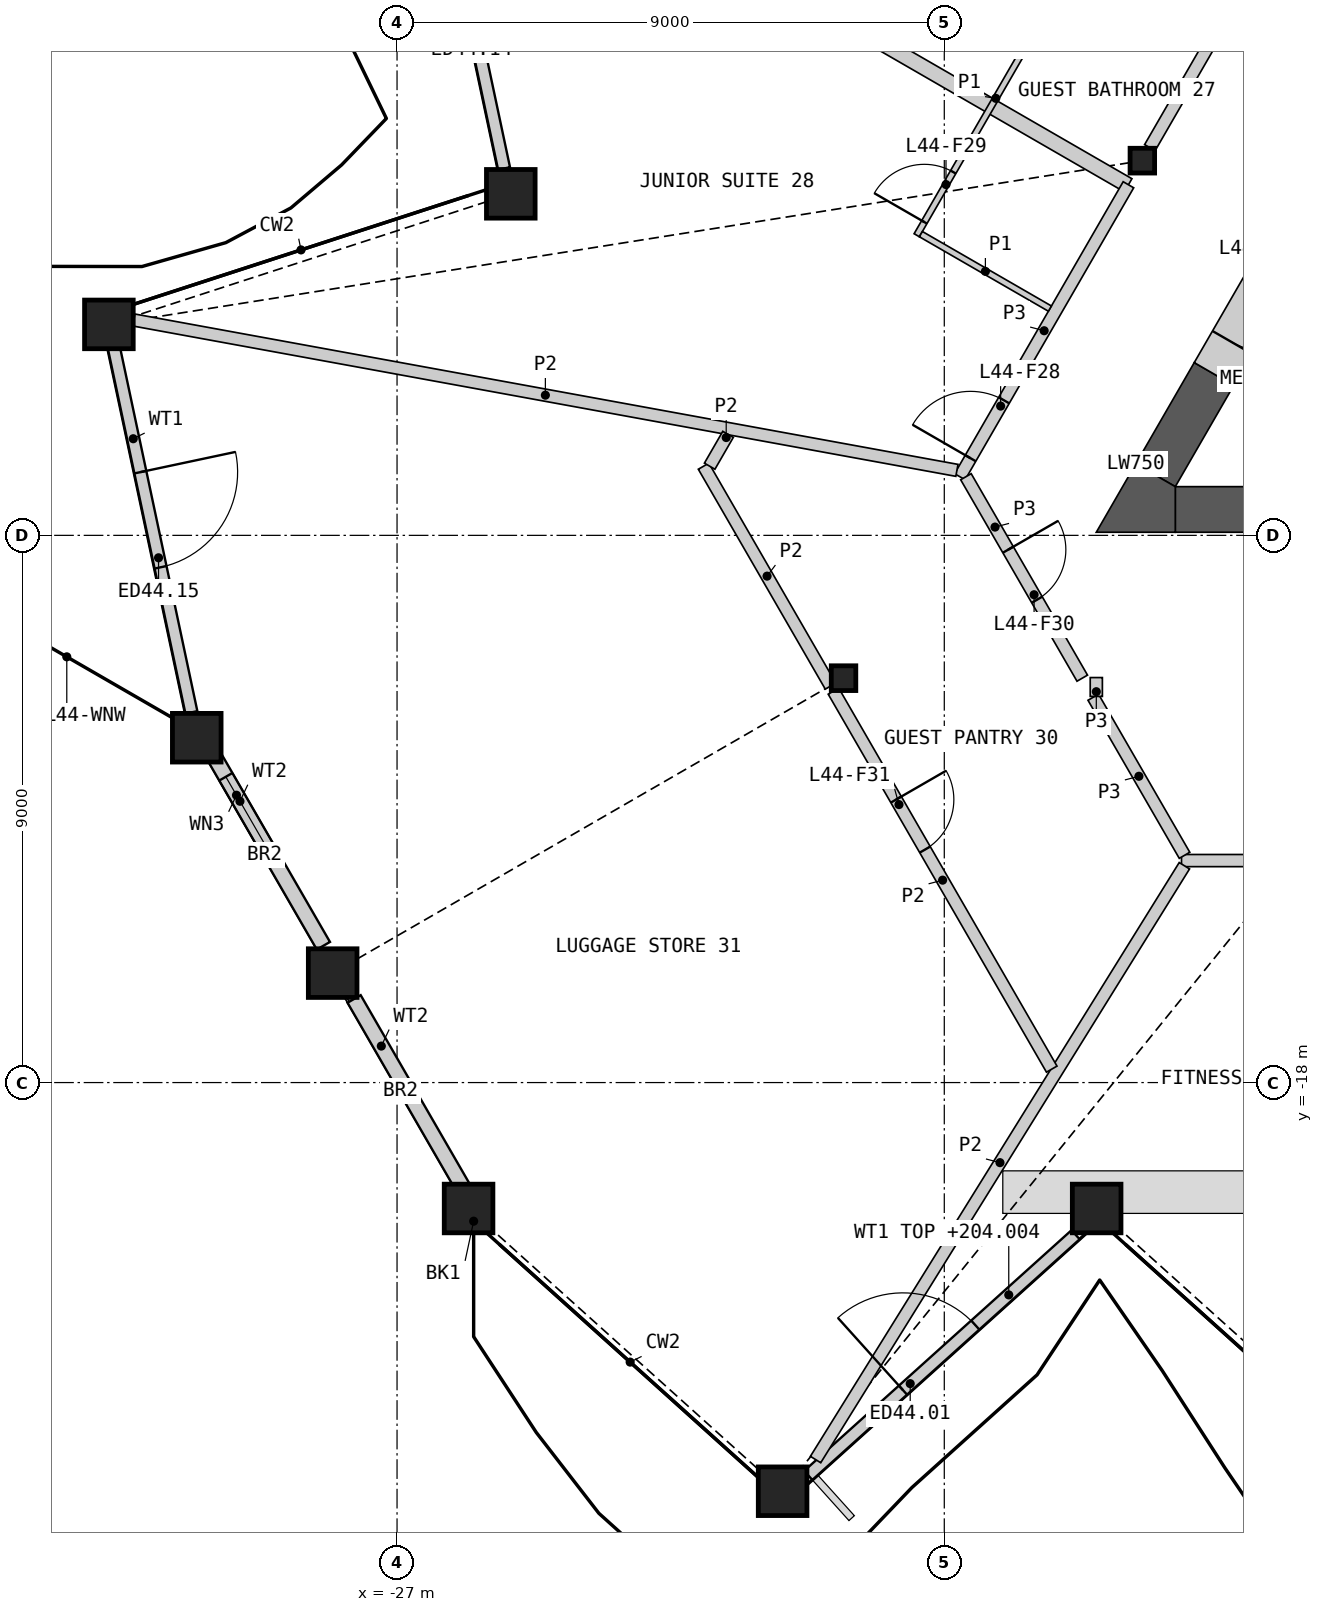
"""IFC4 building model, lengths in metres.
Left out: names, types, materials, properties, quantities, classifications, styles, units other than length and angle.
Written with IfcOpenShell. Run it as: python <this file> out.ifc"""

import sys

from ifc_helpers import new_model, si_unit, direction, frame, frame_2d, origin, origin_2d, place, context, subcontext, project, spatial, polyline, rectangle, hollow_rectangle, i_section, outline, extrude, element, fill, save


model = new_model("IFC4")
c1 = context("Model", 3, precision=1e-05, world=origin(), true_north=direction((0.0, 1.0)))
c2 = subcontext(c1, "Body", "Model", "MODEL_VIEW")
j1 = project(units=[si_unit("LENGTHUNIT", "METRE"), si_unit("PLANEANGLEUNIT", "RADIAN")], contexts=[c1])
p1 = place(None, origin())
s1 = spatial("IfcSite", under=j1, at=p1, CompositionType="ELEMENT")
p2 = place(p1, origin())
s2 = spatial("IfcBuilding", under=s1, at=p2, CompositionType="ELEMENT")
p3 = place(p2, frame((0.0, 0.0, 201.6)))
s3 = spatial("IfcBuildingStorey", under=s2, at=p3, CompositionType="ELEMENT", Elevation=201.6)
for number, where, z_axis, x_axis in (
    (1, (-25.823, -20.071, 0.0), (0.0, 0.0, 1.0), (1.0, 0.0, 0.0)),
    (2, (-20.659, -24.722, 0.0), (0.0, 0.0, 1.0), (1.0, 0.0, 0.0)),
    (3, (-15.494, -20.071, 0.0), (0.0, 0.0, 1.0), (1.0, 0.0, 0.0)),
    (4, (-25.129, -3.383, 0.0), (0.0, 0.0, 1.0), (1.0, 0.0, 0.0)),
    (5, (-31.739, -5.53, 0.0), (0.0, 0.0, 1.0), (1.0, 0.0, 0.0)),
    (6, (-30.294, -12.328, 0.0), (0.0, 0.0, 1.0), (1.0, 0.0, 0.0)),
    (7, (-28.059, -16.2, 0.0), (0.0, 0.0, 1.0), (1.0, 0.0, 0.0)),
):
    element("IfcColumn", number, at=place(p3, frame(where, z_axis=z_axis, x_axis=x_axis)), inside=s3, PredefinedType="COLUMN", context=c2, shape_type="SweptSolid", body=[
        extrude(hollow_rectangle(XDim=0.8, YDim=0.8, WallThickness=0.05, at=origin_2d()), origin(), (0.0, 0.0, 1.0), 3.6),
    ])
for number, where, z_axis, x_axis in (
    (8, (-14.743, -2.837, 0.0), (0.0, 0.0, 1.0), (1.0, 0.0, 0.0)),
    (9, (-19.657, -11.349, 0.0), (0.0, 0.0, 1.0), (1.0, 0.0, 0.0)),
):
    element("IfcColumn", number, at=place(p3, frame(where, z_axis=z_axis, x_axis=x_axis)), inside=s3, PredefinedType="COLUMN", context=c2, shape_type="SweptSolid", body=[
        extrude(i_section(OverallWidth=0.404, OverallDepth=0.407, WebThickness=0.027, FlangeThickness=0.044, at=origin_2d()), origin(), (0.0, 0.0, 1.0), 3.6),
    ])
p4 = place(p3, frame((-20.237, -24.461, 0.0), z_axis=(0.0, 0.0, 1.0), x_axis=(0.743136116571, 0.669140278452, 0.0)))
e10 = element("IfcWall", 10, at=p4, inside=s3, PredefinedType="SOLIDWALL", context=c2, shape_type="SweptSolid", body=[
    extrude(rectangle(XDim=5.916, YDim=0.2, at=frame_2d((2.958, 0.0))), origin(), (0.0, 0.0, 1.0), 2.404),
])
p5 = place(p4, frame((2.096, 0.0, 0.0)))
e11 = element("IfcOpeningElement", 11, at=p5, cuts=e10, PredefinedType="OPENING", context=c2, shape_type="SweptSolid", body=[
    extrude(rectangle(XDim=1.6, YDim=2.4, at=frame_2d((0.8, 1.2))), frame((0.0, 0.11, 0.0), z_axis=(0.0, -1.0, 0.0), x_axis=(1.0, 0.0, 0.0)), (0.0, 0.0, 1.0), 0.22),
])
p6 = place(p3, frame((-26.51, 3.006, 0.0), z_axis=(0.0, 0.0, 1.0), x_axis=(0.207920445063, -0.978145739921, 0.0)))
e12 = element("IfcWall", 12, at=p6, inside=s3, PredefinedType="SOLIDWALL", context=c2, shape_type="SweptSolid", body=[
    extrude(rectangle(XDim=6.106, YDim=0.2, at=frame_2d((3.053, 0.0))), origin(), (0.0, 0.0, 1.0), 2.701),
])
p7 = place(p6, frame((2.096, 0.0, 0.0)))
e13 = element("IfcOpeningElement", 13, at=p7, cuts=e12, PredefinedType="OPENING", context=c2, shape_type="SweptSolid", body=[
    extrude(rectangle(XDim=1.6, YDim=2.4, at=frame_2d((0.8, 1.2))), frame((0.0, 0.11, 0.0), z_axis=(0.0, -1.0, 0.0), x_axis=(1.0, 0.0, 0.0)), (0.0, 0.0, 1.0), 0.22),
])
p8 = place(p3, frame((-31.657, -5.91, 0.0), z_axis=(0.0, 0.0, 1.0), x_axis=(0.207917293494, -0.978146409831, 0.0)))
e14 = element("IfcWall", 14, at=p8, inside=s3, PredefinedType="SOLIDWALL", context=c2, shape_type="SweptSolid", body=[
    extrude(rectangle(XDim=6.135, YDim=0.2, at=frame_2d((3.068, 0.0))), origin(), (0.0, 0.0, 1.0), 2.701),
])
p9 = place(p8, frame((2.096, 0.0, 0.0)))
e15 = element("IfcOpeningElement", 15, at=p9, cuts=e14, PredefinedType="OPENING", context=c2, shape_type="SweptSolid", body=[
    extrude(rectangle(XDim=1.6, YDim=2.4, at=frame_2d((0.8, 1.2))), frame((0.0, 0.11, 0.0), z_axis=(0.0, -1.0, 0.0), x_axis=(1.0, 0.0, 0.0)), (0.0, 0.0, 1.0), 0.22),
])
p10 = place(p3, frame((-30.041, -12.581, 0.0), z_axis=(0.0, 0.0, 1.0), x_axis=(0.499978523533, -0.866037802874, 0.0)))
e16 = element("IfcWall", 16, at=p10, inside=s3, PredefinedType="SOLIDWALL", context=c2, shape_type="SweptSolid", body=[
    extrude(rectangle(XDim=3.659, YDim=0.25, at=frame_2d((1.83, 0.0))), origin(), (0.0, 0.0, 1.0), 2.701),
])
p11 = place(p10, frame((0.45, 0.0, 1.7)))
e17 = element("IfcOpeningElement", 17, at=p11, cuts=e16, PredefinedType="OPENING", context=c2, shape_type="SweptSolid", body=[
    extrude(rectangle(XDim=1.4, YDim=0.8, at=frame_2d((0.7, 0.4))), frame((0.0, 0.135, 0.0), z_axis=(0.0, -1.0, 0.0), x_axis=(1.0, 0.0, 0.0)), (0.0, 0.0, 1.0), 0.27),
])
p12 = place(p3, frame((-27.706, -16.625, 0.0), z_axis=(0.0, 0.0, 1.0), x_axis=(0.500054932303, -0.865993686281, 0.0)))
e18 = element("IfcWall", 18, at=p12, inside=s3, PredefinedType="SOLIDWALL", context=c2, shape_type="SweptSolid", body=[
    extrude(rectangle(XDim=3.581, YDim=0.25, at=frame_2d((1.79, 0.0))), origin(), (0.0, 0.0, 1.0), 2.701),
])
p13 = place(p3, frame((-14.201, -8.574, 0.0), z_axis=(0.0, 0.0, 1.0), x_axis=(1.0, 0.0, 0.0)))
e19 = element("IfcWall", 19, at=p13, inside=s3, PredefinedType="SHEAR", context=c2, shape_type="SweptSolid", body=[
    extrude(rectangle(XDim=6.785, YDim=0.75, at=frame_2d((3.393, 0.0))), origin(), (0.0, 0.0, 1.0), 3.25),
])
p14 = place(p3, frame((-13.564, -6.346, 0.0), z_axis=(0.0, 0.0, 1.0), x_axis=(-0.499989888488, -0.86603124159, 0.0)))
e20 = element("IfcWall", 20, at=p14, inside=s3, PredefinedType="SHEAR", context=c2, shape_type="SweptSolid", body=[
    extrude(rectangle(XDim=1.923, YDim=0.75, at=frame_2d((0.961, 0.0))), origin(), (0.0, 0.0, 1.0), 3.25),
])
p15 = place(p3, origin())
e21 = element("IfcWall", 21, at=p15, inside=s3, PredefinedType="SHEAR", context=c2, shape_type="SweptSolid", body=[
    extrude(outline(polyline([(-14.851, -7.824), (-14.201, -8.199), (-14.201, -8.949), (-15.5, -8.949), (-14.851, -7.824)])), origin(), (0.0, 0.0, 1.0), 3.25),
])
p16 = place(p3, frame((-12.464, -4.441, 0.0), z_axis=(0.0, 0.0, 1.0), x_axis=(-0.499994660107, -0.866028486751, 0.0)))
e22 = element("IfcWall", 22, at=p16, inside=s3, PredefinedType="SHEAR", context=c2, shape_type="SweptSolid", body=[
    extrude(rectangle(XDim=2.2, YDim=0.75, at=frame_2d((1.1, 0.0))), origin(), (0.0, 0.0, 1.0), 3.25),
])
p17 = place(p16, frame((0.6, 0.0, 0.0)))
e23 = element("IfcOpeningElement", 23, at=p17, cuts=e22, PredefinedType="OPENING", context=c2, shape_type="SweptSolid", body=[
    extrude(rectangle(XDim=1.0, YDim=2.1, at=frame_2d((0.5, 1.05))), frame((0.0, 0.385, 0.0), z_axis=(0.0, -1.0, 0.0), x_axis=(1.0, 0.0, 0.0)), (0.0, 0.0, 1.0), 0.77),
])
p18 = place(p3, frame((-14.099, -14.349, 0.0), z_axis=(0.0, 0.0, 1.0), x_axis=(1.0, 0.0, 0.0)))
e24 = element("IfcWall", 24, at=p18, inside=s3, PredefinedType="PARTITIONING", context=c2, shape_type="SweptSolid", body=[
    extrude(rectangle(XDim=28.198, YDim=0.2, at=frame_2d((14.099, 0.0))), origin(), (0.0, 0.0, 1.0), 3.25),
])
p19 = place(p18, frame((1.053, 0.0, 0.0)))
e25 = element("IfcOpeningElement", 25, at=p19, cuts=e24, PredefinedType="OPENING", context=c2, shape_type="SweptSolid", body=[
    extrude(rectangle(XDim=1.8, YDim=2.1, at=frame_2d((0.9, 1.05))), frame((0.0, 0.11, 0.0), z_axis=(0.0, -1.0, 0.0), x_axis=(1.0, 0.0, 0.0)), (0.0, 0.0, 1.0), 0.22),
])
p20 = place(p18, frame((4.064, 0.0, 0.0)))
e26 = element("IfcOpeningElement", 26, at=p20, cuts=e24, PredefinedType="OPENING", context=c2, shape_type="SweptSolid", body=[
    extrude(rectangle(XDim=1.0, YDim=2.1, at=frame_2d((0.5, 1.05))), frame((0.0, 0.11, 0.0), z_axis=(0.0, -1.0, 0.0), x_axis=(1.0, 0.0, 0.0)), (0.0, 0.0, 1.0), 0.22),
])
p21 = place(p18, frame((12.796, 0.0, 0.0)))
e27 = element("IfcOpeningElement", 27, at=p21, cuts=e24, PredefinedType="OPENING", context=c2, shape_type="SweptSolid", body=[
    extrude(rectangle(XDim=1.0, YDim=2.1, at=frame_2d((0.5, 1.05))), frame((0.0, 0.11, 0.0), z_axis=(0.0, -1.0, 0.0), x_axis=(1.0, 0.0, 0.0)), (0.0, 0.0, 1.0), 0.22),
])
p22 = place(p18, frame((18.318, 0.0, 0.0)))
e28 = element("IfcOpeningElement", 28, at=p22, cuts=e24, PredefinedType="OPENING", context=c2, shape_type="SweptSolid", body=[
    extrude(rectangle(XDim=1.8, YDim=2.1, at=frame_2d((0.9, 1.05))), frame((0.0, 0.11, 0.0), z_axis=(0.0, -1.0, 0.0), x_axis=(1.0, 0.0, 0.0)), (0.0, 0.0, 1.0), 0.22),
])
p23 = place(p18, frame((25.345, 0.0, 0.0)))
e29 = element("IfcOpeningElement", 29, at=p23, cuts=e24, PredefinedType="OPENING", context=c2, shape_type="SweptSolid", body=[
    extrude(rectangle(XDim=1.8, YDim=2.1, at=frame_2d((0.9, 1.05))), frame((0.0, 0.11, 0.0), z_axis=(0.0, -1.0, 0.0), x_axis=(1.0, 0.0, 0.0)), (0.0, 0.0, 1.0), 0.22),
])
p24 = place(p3, frame((-26.164, 3.217, 0.0), z_axis=(0.0, 0.0, 1.0), x_axis=(0.866026026416, -0.499998921569, 0.0)))
e30 = element("IfcWall", 30, at=p24, inside=s3, PredefinedType="PARTITIONING", context=c2, shape_type="SweptSolid", body=[
    extrude(rectangle(XDim=12.918, YDim=0.25, at=frame_2d((6.459, 0.0))), origin(), (0.0, 0.0, 1.0), 2.404),
])
p25 = place(p3, frame((-14.619, -2.624, 0.0), z_axis=(0.0, 0.0, 1.0), x_axis=(0.50000393355, 0.866023132736, 0.0)))
e31 = element("IfcWall", 31, at=p25, inside=s3, PredefinedType="PARTITIONING", context=c2, shape_type="SweptSolid", body=[
    extrude(rectangle(XDim=9.335, YDim=0.2, at=frame_2d((4.667, 0.0))), origin(), (0.0, 0.0, 1.0), 3.25),
])
p26 = place(p25, frame((3.163, 0.0, 0.0)))
e32 = element("IfcOpeningElement", 32, at=p26, cuts=e31, PredefinedType="OPENING", context=c2, shape_type="SweptSolid", body=[
    extrude(rectangle(XDim=1.0, YDim=2.1, at=frame_2d((0.5, 1.05))), frame((0.0, 0.11, 0.0), z_axis=(0.0, -1.0, 0.0), x_axis=(1.0, 0.0, 0.0)), (0.0, 0.0, 1.0), 0.22),
])
p27 = place(p3, frame((-17.744, -8.035, 0.0), z_axis=(0.0, 0.0, 1.0), x_axis=(0.500003221507, 0.866023543838, 0.0)))
e33 = element("IfcWall", 33, at=p27, inside=s3, PredefinedType="PARTITIONING", context=c2, shape_type="SweptSolid", body=[
    extrude(rectangle(XDim=5.545, YDim=0.2, at=frame_2d((2.772, 0.0))), origin(), (0.0, 0.0, 1.0), 3.25),
])
p28 = place(p27, frame((0.351, 0.0, 0.0)))
e34 = element("IfcOpeningElement", 34, at=p28, cuts=e33, PredefinedType="OPENING", context=c2, shape_type="SweptSolid", body=[
    extrude(rectangle(XDim=1.1, YDim=2.1, at=frame_2d((0.55, 1.05))), frame((0.0, 0.11, 0.0), z_axis=(0.0, -1.0, 0.0), x_axis=(1.0, 0.0, 0.0)), (0.0, 0.0, 1.0), 0.22),
])
p29 = place(p3, frame((-17.644, -8.035, 0.0), z_axis=(0.0, 0.0, 1.0), x_axis=(0.499961815444, -0.866047448526, 0.0)))
e35 = element("IfcWall", 35, at=p29, inside=s3, PredefinedType="PARTITIONING", context=c2, shape_type="SweptSolid", body=[
    extrude(rectangle(XDim=3.826, YDim=0.2, at=frame_2d((1.913, 0.0))), origin(), (0.0, 0.0, 1.0), 3.25),
])
p30 = place(p29, frame((1.386, 0.0, 0.0)))
e36 = element("IfcOpeningElement", 36, at=p30, cuts=e35, PredefinedType="OPENING", context=c2, shape_type="SweptSolid", body=[
    extrude(rectangle(XDim=0.95, YDim=2.1, at=frame_2d((0.475, 1.05))), frame((0.0, 0.11, 0.0), z_axis=(0.0, -1.0, 0.0), x_axis=(1.0, 0.0, 0.0)), (0.0, 0.0, 1.0), 0.22),
])
p31 = place(p3, frame((-15.55, -11.662, 0.0), z_axis=(0.0, 0.0, 1.0), x_axis=(0.500048608389, -0.865997337899, 0.0)))
e37 = element("IfcWall", 37, at=p31, inside=s3, PredefinedType="PARTITIONING", context=c2, shape_type="SweptSolid", body=[
    extrude(rectangle(XDim=3.002, YDim=0.2, at=frame_2d((1.501, 0.0))), origin(), (0.0, 0.0, 1.0), 3.25),
])
p32 = place(p3, frame((-15.5, -11.649, 0.0), z_axis=(0.0, 0.0, 1.0), x_axis=(0.0, 1.0, 0.0)))
e38 = element("IfcWall", 38, at=p32, inside=s3, PredefinedType="PARTITIONING", context=c2, shape_type="SweptSolid", body=[
    extrude(rectangle(XDim=0.31, YDim=0.2, at=frame_2d((0.155, 0.0))), origin(), (0.0, 0.0, 1.0), 3.25),
])
p33 = place(p3, frame((-31.329, -5.458, 0.0), z_axis=(0.0, 0.0, 1.0), x_axis=(0.983720538919, -0.179705039744, 0.0)))
e39 = element("IfcWall", 39, at=p33, inside=s3, PredefinedType="PARTITIONING", context=c2, shape_type="SweptSolid", body=[
    extrude(rectangle(XDim=13.761, YDim=0.2, at=frame_2d((6.88, 0.0))), origin(), (0.0, 0.0, 1.0), 2.404),
])
p34 = place(p3, frame((-20.117, -24.2, 0.0), z_axis=(0.0, 0.0, 1.0), x_axis=(0.527576403825, 0.849507585679, 0.0)))
e40 = element("IfcWall", 40, at=p34, inside=s3, PredefinedType="PARTITIONING", context=c2, shape_type="SweptSolid", body=[
    extrude(rectangle(XDim=11.497, YDim=0.2, at=frame_2d((5.749, 0.0))), origin(), (0.0, 0.0, 1.0), 2.404),
])
p35 = place(p3, frame((-19.822, -11.562, 0.0), z_axis=(0.0, 0.0, 1.0), x_axis=(0.500008997517, -0.866020209003, 0.0)))
e41 = element("IfcWall", 41, at=p35, inside=s3, PredefinedType="PARTITIONING", context=c2, shape_type="SweptSolid", body=[
    extrude(rectangle(XDim=7.178, YDim=0.2, at=frame_2d((3.589, 0.0))), origin(), (0.0, 0.0, 1.0), 2.404),
])
p36 = place(p35, frame((2.059, 0.0, 0.0)))
e42 = element("IfcOpeningElement", 42, at=p36, cuts=e41, PredefinedType="OPENING", context=c2, shape_type="SweptSolid", body=[
    extrude(rectangle(XDim=0.95, YDim=2.1, at=frame_2d((0.475, 1.05))), frame((0.0, 0.11, 0.0), z_axis=(0.0, -1.0, 0.0), x_axis=(1.0, 0.0, 0.0)), (0.0, 0.0, 1.0), 0.22),
])
p37 = place(p3, frame((-21.958, -7.862, 0.0), z_axis=(0.0, 0.0, 1.0), x_axis=(0.499987304225, -0.866032733569, 0.0)))
e43 = element("IfcWall", 43, at=p37, inside=s3, PredefinedType="PARTITIONING", context=c2, shape_type="SweptSolid", body=[
    extrude(rectangle(XDim=4.176, YDim=0.2, at=frame_2d((2.088, 0.0))), origin(), (0.0, 0.0, 1.0), 2.404),
])
p38 = place(p3, frame((-21.859, -7.862, 0.0), z_axis=(0.0, 0.0, 1.0), x_axis=(0.50022374246, 0.865896187473, 0.0)))
e44 = element("IfcWall", 44, at=p38, inside=s3, PredefinedType="PARTITIONING", context=c2, shape_type="SweptSolid", body=[
    extrude(rectangle(XDim=0.604, YDim=0.2, at=frame_2d((0.302, 0.0))), origin(), (0.0, 0.0, 1.0), 2.404),
])
p39 = place(p3, frame((-18.453, -4.064, 0.0), z_axis=(0.0, 0.0, 1.0), x_axis=(0.499971721724, 0.866041729639, 0.0)))
e45 = element("IfcWall", 45, at=p39, inside=s3, PredefinedType="PARTITIONING", context=c2, shape_type="SweptSolid", body=[
    extrude(rectangle(XDim=5.2, YDim=0.1, at=frame_2d((2.6, 0.0))), origin(), (0.0, 0.0, 1.0), 2.404),
])
p40 = place(p39, frame((4.0, 0.0, 0.0)))
e46 = element("IfcOpeningElement", 46, at=p40, cuts=e45, PredefinedType="OPENING", context=c2, shape_type="SweptSolid", body=[
    extrude(rectangle(XDim=0.95, YDim=2.1, at=frame_2d((0.475, 1.05))), frame((0.0, 0.06, 0.0), z_axis=(0.0, -1.0, 0.0), x_axis=(1.0, 0.0, 0.0)), (0.0, 0.0, 1.0), 0.12),
])
p41 = place(p39, frame((0.25, 0.0, 0.0)))
e47 = element("IfcOpeningElement", 47, at=p41, cuts=e45, PredefinedType="OPENING", context=c2, shape_type="SweptSolid", body=[
    extrude(rectangle(XDim=0.95, YDim=2.1, at=frame_2d((0.475, 1.05))), frame((0.0, 0.06, 0.0), z_axis=(0.0, -1.0, 0.0), x_axis=(1.0, 0.0, 0.0)), (0.0, 0.0, 1.0), 0.12),
])
p42 = place(p3, frame((-18.385, -4.046, 0.0), z_axis=(0.0, 0.0, 1.0), x_axis=(0.866057815567, -0.499943856944, 0.0)))
e48 = element("IfcWall", 48, at=p42, inside=s3, PredefinedType="PARTITIONING", context=c2, shape_type="SweptSolid", body=[
    extrude(rectangle(XDim=2.45, YDim=0.1, at=frame_2d((1.225, 0.0))), origin(), (0.0, 0.0, 1.0), 2.404),
])
p43 = place(p5, origin())
e49 = element("IfcDoor", 49, at=p43, inside=s3, OperationType="DOUBLE_DOOR_SINGLE_SWING", PredefinedType="DOOR", context=c2, shape_type="SweptSolid", body=[
    extrude(rectangle(XDim=1.6, YDim=2.4, at=frame_2d((0.8, 1.2))), frame((0.0, 0.025, 0.0), z_axis=(0.0, -1.0, 0.0), x_axis=(1.0, 0.0, 0.0)), (0.0, 0.0, 1.0), 0.05),
])
fill(e11, e49)
p44 = place(p9, origin())
e50 = element("IfcDoor", 50, at=p44, inside=s3, OperationType="DOUBLE_DOOR_SINGLE_SWING", PredefinedType="DOOR", context=c2, shape_type="SweptSolid", body=[
    extrude(rectangle(XDim=1.6, YDim=2.4, at=frame_2d((0.8, 1.2))), frame((0.0, 0.025, 0.0), z_axis=(0.0, -1.0, 0.0), x_axis=(1.0, 0.0, 0.0)), (0.0, 0.0, 1.0), 0.05),
])
fill(e15, e50)
p45 = place(p11, origin())
e51 = element("IfcWindow", 51, at=p45, inside=s3, PartitioningType="SINGLE_PANEL", PredefinedType="WINDOW", context=c2, shape_type="SweptSolid", body=[
    extrude(rectangle(XDim=1.4, YDim=0.8, at=frame_2d((0.7, 0.4))), frame((0.0, 0.03, 0.0), z_axis=(0.0, -1.0, 0.0), x_axis=(1.0, 0.0, 0.0)), (0.0, 0.0, 1.0), 0.06),
])
fill(e17, e51)
p46 = place(p17, origin())
e52 = element("IfcDoor", 52, at=p46, inside=s3, OperationType="SINGLE_SWING_LEFT", PredefinedType="DOOR", context=c2, shape_type="SweptSolid", body=[
    extrude(rectangle(XDim=1.0, YDim=2.1, at=frame_2d((0.5, 1.05))), frame((0.0, 0.13, 0.0), z_axis=(0.0, -1.0, 0.0), x_axis=(1.0, 0.0, 0.0)), (0.0, 0.0, 1.0), 0.05),
])
fill(e23, e52)
p47 = place(p28, origin())
e53 = element("IfcDoor", 53, at=p47, inside=s3, OperationType="SINGLE_SWING_LEFT", PredefinedType="DOOR", context=c2, shape_type="SweptSolid", body=[
    extrude(rectangle(XDim=1.1, YDim=2.1, at=frame_2d((0.55, 1.05))), frame((0.0, 0.025, 0.0), z_axis=(0.0, -1.0, 0.0), x_axis=(1.0, 0.0, 0.0)), (0.0, 0.0, 1.0), 0.05),
])
fill(e34, e53)
p48 = place(p41, origin())
e54 = element("IfcDoor", 54, at=p48, inside=s3, OperationType="SINGLE_SWING_LEFT", PredefinedType="DOOR", context=c2, shape_type="SweptSolid", body=[
    extrude(rectangle(XDim=0.95, YDim=2.1, at=frame_2d((0.475, 1.05))), frame((0.0, 0.025, 0.0), z_axis=(0.0, -1.0, 0.0), x_axis=(1.0, 0.0, 0.0)), (0.0, 0.0, 1.0), 0.05),
])
fill(e47, e54)
p49 = place(p30, origin())
e55 = element("IfcDoor", 55, at=p49, inside=s3, OperationType="SINGLE_SWING_LEFT", PredefinedType="DOOR", context=c2, shape_type="SweptSolid", body=[
    extrude(rectangle(XDim=0.95, YDim=2.1, at=frame_2d((0.475, 1.05))), frame((0.0, 0.025, 0.0), z_axis=(0.0, -1.0, 0.0), x_axis=(1.0, 0.0, 0.0)), (0.0, 0.0, 1.0), 0.05),
])
fill(e36, e55)
p50 = place(p36, origin())
e56 = element("IfcDoor", 56, at=p50, inside=s3, OperationType="SINGLE_SWING_LEFT", PredefinedType="DOOR", context=c2, shape_type="SweptSolid", body=[
    extrude(rectangle(XDim=0.95, YDim=2.1, at=frame_2d((0.475, 1.05))), frame((0.0, 0.025, 0.0), z_axis=(0.0, -1.0, 0.0), x_axis=(1.0, 0.0, 0.0)), (0.0, 0.0, 1.0), 0.05),
])
fill(e42, e56)
save(model, sys.argv[1])
